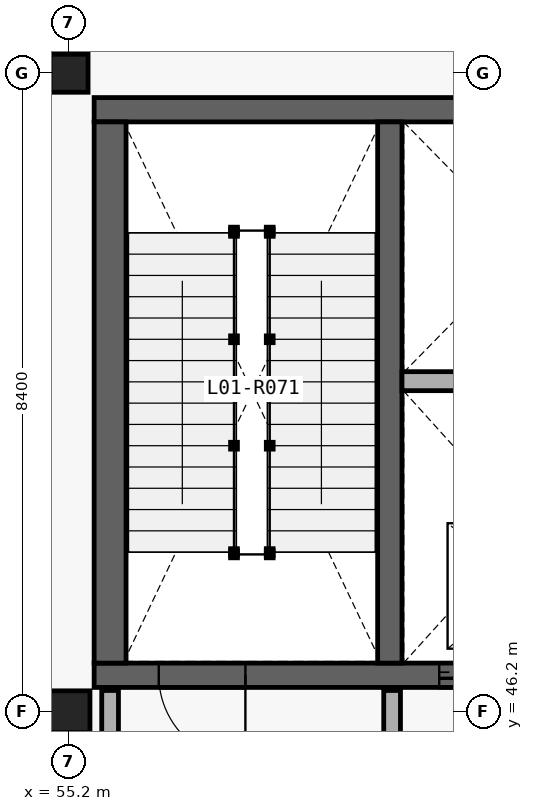
"""IFC4 building model, lengths in metres.
Left out: names, types, materials, properties, quantities, classifications, styles, units other than length and angle.
Written with IfcOpenShell. Run it as: python <this file> out.ifc"""

import sys

from ifc_helpers import new_model, si_unit, direction, frame, frame_2d, origin_with_axes, origin_2d_with_axis, place, context, subcontext, project, spatial, rectangle, i_section, extrude, element, fill, save


model = new_model("IFC4")
c1 = context("Model", 3, precision=1e-05, world=origin_with_axes(), true_north=direction((0.0, 1.0)))
c2 = subcontext(c1, "Body", "Model", "MODEL_VIEW")
j1 = project(units=[si_unit("LENGTHUNIT", "METRE"), si_unit("PLANEANGLEUNIT", "RADIAN")], contexts=[c1])
p1 = place(None, origin_with_axes())
s1 = spatial("IfcSite", under=j1, at=p1, CompositionType="ELEMENT")
p2 = place(p1, origin_with_axes())
s2 = spatial("IfcBuilding", under=s1, at=p2, CompositionType="ELEMENT")
p3 = place(p2, frame((0.0, 0.0, 5.4), z_axis=(0.0, 0.0, 1.0), x_axis=(1.0, 0.0, 0.0)))
s3 = spatial("IfcBuildingStorey", under=s2, at=p3, CompositionType="ELEMENT", Elevation=5.4)
p4 = place(None, frame((55.53, 46.68, 5.4), z_axis=(0.0, 0.0, 1.0), x_axis=(1.0, 0.0, 0.0)))
e1 = element("IfcWall", 1, at=p4, inside=s3, PredefinedType="SHEAR", context=c2, shape_type="SweptSolid", body=[
    extrude(rectangle(XDim=7.74, YDim=0.32, at=frame_2d((3.87, 0.0), x_axis=(1.0, 0.0))), origin_with_axes(), (0.0, 0.0, 1.0), 5.4),
])
p5 = place(None, frame((56.95, 46.68, 5.4), z_axis=(0.0, 0.0, 1.0), x_axis=(1.0, 0.0, 0.0)))
e2 = element("IfcOpeningElement", 2, at=p5, cuts=e1, PredefinedType="OPENING", context=c2, shape_type="SweptSolid", body=[
    extrude(rectangle(XDim=1.14, YDim=2.18, at=frame_2d((0.0, 1.09), x_axis=(1.0, 0.0))), frame((0.0, 0.17, 0.0), z_axis=(0.0, -1.0, 0.0), x_axis=(1.0, 0.0, 0.0)), (0.0, 0.0, 1.0), 0.34),
])
p6 = place(None, frame((60.65, 46.68, 5.4), z_axis=(0.0, 0.0, 1.0), x_axis=(1.0, 0.0, 0.0)))
e3 = element("IfcOpeningElement", 3, at=p6, cuts=e1, PredefinedType="OPENING", context=c2, shape_type="SweptSolid", body=[
    extrude(rectangle(XDim=1.16, YDim=2.2, at=frame_2d((0.0, 1.1), x_axis=(1.0, 0.0))), frame((0.0, 0.17, 0.0), z_axis=(0.0, -1.0, 0.0), x_axis=(1.0, 0.0, 0.0)), (0.0, 0.0, 1.0), 0.34),
])
p7 = place(None, frame((63.27, 54.12, 5.4), z_axis=(0.0, 0.0, 1.0), x_axis=(-1.0, 0.0, 0.0)))
e4 = element("IfcWall", 4, at=p7, inside=s3, PredefinedType="SHEAR", context=c2, shape_type="SweptSolid", body=[
    extrude(rectangle(XDim=7.74, YDim=0.32, at=frame_2d((3.87, 0.0), x_axis=(1.0, 0.0))), origin_with_axes(), (0.0, 0.0, 1.0), 5.4),
])
p8 = place(None, frame((55.74, 53.96, 5.4), z_axis=(0.0, 0.0, 1.0), x_axis=(0.0, -1.0, 0.0)))
e5 = element("IfcWall", 5, at=p8, inside=s3, PredefinedType="SHEAR", context=c2, shape_type="SweptSolid", body=[
    extrude(rectangle(XDim=7.12, YDim=0.42, at=frame_2d((3.56, 0.0), x_axis=(1.0, 0.0))), origin_with_axes(), (0.0, 0.0, 1.0), 5.4),
])
p9 = place(None, frame((59.42, 46.84, 5.4), z_axis=(0.0, 0.0, 1.0), x_axis=(0.0, 1.0, 0.0)))
e6 = element("IfcWall", 6, at=p9, inside=s3, PredefinedType="SHEAR", context=c2, shape_type="SweptSolid", body=[
    extrude(rectangle(XDim=7.12, YDim=0.32, at=frame_2d((3.56, 0.0), x_axis=(1.0, 0.0))), origin_with_axes(), (0.0, 0.0, 1.0), 5.4),
])
p10 = place(None, frame((59.58, 50.549, 5.4), z_axis=(0.0, 0.0, 1.0), x_axis=(1.0, 0.0, 0.0)))
e7 = element("IfcWall", 7, at=p10, inside=s3, PredefinedType="PARTITIONING", context=c2, shape_type="SweptSolid", body=[
    extrude(rectangle(XDim=3.27, YDim=0.25, at=frame_2d((1.635, 0.0), x_axis=(1.0, 0.0))), origin_with_axes(), (0.0, 0.0, 1.0), 5.08),
])
for number, where, z_axis, x_axis in (
    (8, (55.74, 45.22, 5.4), (0.0, 0.0, 1.0), (0.0, 1.0, 0.0)),
    (9, (59.45, 45.22, 5.4), (0.0, 0.0, 1.0), (0.0, 1.0, 0.0)),
):
    element("IfcWall", number, at=place(None, frame(where, z_axis=z_axis, x_axis=x_axis)), inside=s3, PredefinedType="PARTITIONING", context=c2, shape_type="SweptSolid", body=[
        extrude(rectangle(XDim=1.26, YDim=0.22, at=frame_2d((0.63, 0.0), x_axis=(1.0, 0.0))), origin_with_axes(), (0.0, 0.0, 1.0), 5.08),
    ])
p11 = place(None, frame((55.2, 46.2, 5.4), z_axis=(0.0, 0.0, 1.0), x_axis=(1.0, 0.0, 0.0)))
e10 = element("IfcColumn", 10, at=p11, inside=s3, PredefinedType="COLUMN", context=c2, shape_type="SweptSolid", body=[
    extrude(i_section(OverallWidth=0.55, OverallDepth=0.55, WebThickness=0.025, FlangeThickness=0.042, at=origin_2d_with_axis()), origin_with_axes(), (0.0, 0.0, 1.0), 5.4),
])
p12 = place(None, frame((55.2, 54.6, 5.4), z_axis=(0.0, 0.0, 1.0), x_axis=(1.0, 0.0, 0.0)))
e11 = element("IfcColumn", 11, at=p12, inside=s3, PredefinedType="COLUMN", context=c2, shape_type="SweptSolid", body=[
    extrude(i_section(OverallWidth=0.5, OverallDepth=0.5, WebThickness=0.022, FlangeThickness=0.036, at=origin_2d_with_axis()), origin_with_axes(), (0.0, 0.0, 1.0), 5.4),
])
p13 = place(None, frame((56.95, 46.68, 5.4), z_axis=(0.0, 0.0, 1.0), x_axis=(-1.0, 0.0, 0.0)))
e12 = element("IfcDoor", 12, at=p13, inside=s3, OperationType="SINGLE_SWING_RIGHT", PredefinedType="DOOR", context=c2, shape_type="SweptSolid", body=[
    extrude(rectangle(XDim=1.14, YDim=2.18, at=frame_2d((0.0, 1.09), x_axis=(1.0, 0.0))), frame((0.0, 0.04, 0.0), z_axis=(0.0, -1.0, 0.0), x_axis=(1.0, 0.0, 0.0)), (0.0, 0.0, 1.0), 0.08),
])
fill(e2, e12)
p14 = place(None, frame((60.65, 46.68, 5.4), z_axis=(0.0, 0.0, 1.0), x_axis=(-1.0, 0.0, 0.0)))
e13 = element("IfcDoor", 13, at=p14, inside=s3, OperationType="SLIDING_TO_LEFT", PredefinedType="DOOR", context=c2, shape_type="SweptSolid", body=[
    extrude(rectangle(XDim=1.16, YDim=2.2, at=frame_2d((0.0, 1.1), x_axis=(1.0, 0.0))), frame((0.0, 0.04, 0.0), z_axis=(0.0, -1.0, 0.0), x_axis=(1.0, 0.0, 0.0)), (0.0, 0.0, 1.0), 0.08),
])
fill(e3, e13)
save(model, sys.argv[1])
